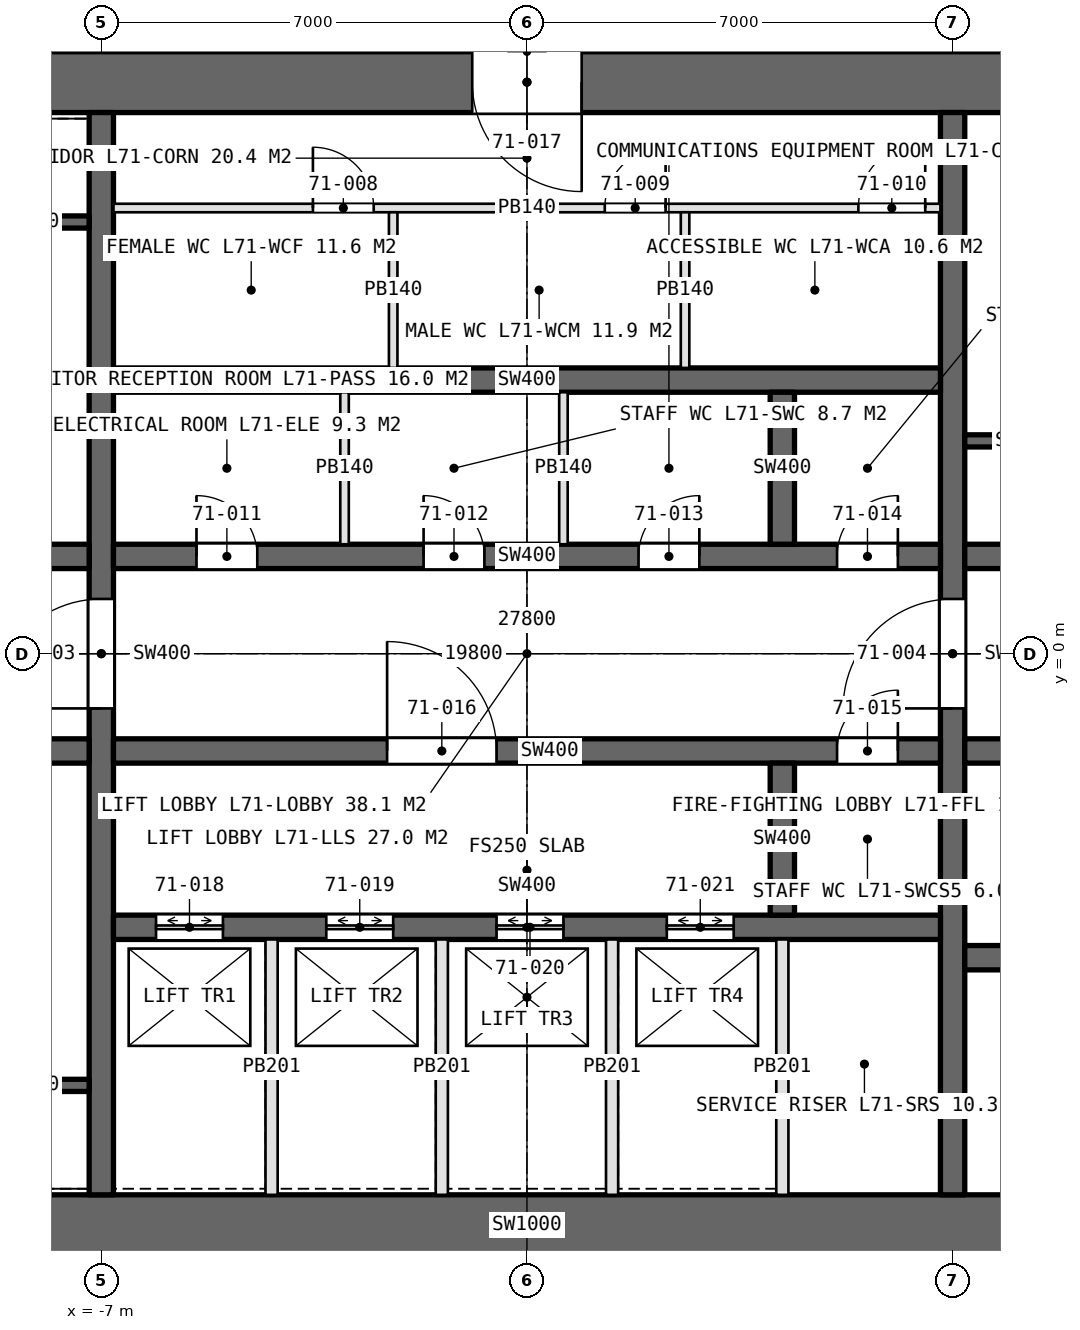
"""IFC4 building model, lengths in metres.
Left out: names, types, materials, properties, quantities, classifications, styles, units other than length and angle.
Written with IfcOpenShell. Run it as: python <this file> out.ifc"""

import sys

from ifc_helpers import new_model, si_unit, direction, frame, frame_2d, origin, place, context, subcontext, project, spatial, rectangle, extrude, element, fill, save


model = new_model("IFC4")
c1 = context("Model", 3, precision=1e-05, world=origin(), true_north=direction((0.0, 1.0)))
c2 = subcontext(c1, "Body", "Model", "MODEL_VIEW")
j1 = project(units=[si_unit("LENGTHUNIT", "METRE"), si_unit("PLANEANGLEUNIT", "RADIAN")], contexts=[c1])
p1 = place(None, origin())
s1 = spatial("IfcSite", under=j1, at=p1, CompositionType="ELEMENT")
p2 = place(p1, origin())
s2 = spatial("IfcBuilding", under=s1, at=p2, CompositionType="ELEMENT")
p3 = place(p2, frame((0.0, 0.0, 317.4)))
s3 = spatial("IfcBuildingStorey", under=s2, at=p3, CompositionType="ELEMENT", Elevation=317.4)
p4 = place(p3, frame((-13.9, -9.4, 0.0), z_axis=(0.0, 0.0, 1.0), x_axis=(1.0, 0.0, 0.0)))
e1 = element("IfcWall", 1, at=p4, inside=s3, PredefinedType="SHEAR", context=c2, shape_type="SweptSolid", body=[
    extrude(rectangle(XDim=27.8, YDim=1.0, at=frame_2d((13.9, 0.0))), origin(), (0.0, 0.0, 1.0), 4.2),
])
p5 = place(p4, frame((22.95, 0.0, 0.0)))
e2 = element("IfcOpeningElement", 2, at=p5, cuts=e1, PredefinedType="OPENING", context=c2, shape_type="SweptSolid", body=[
    extrude(rectangle(XDim=2.2, YDim=2.7, at=frame_2d((1.1, 1.35))), frame((0.0, 0.51, 0.0), z_axis=(0.0, -1.0, 0.0), x_axis=(1.0, 0.0, 0.0)), (0.0, 0.0, 1.0), 1.02),
])
p6 = place(p3, frame((13.9, 9.4, 0.0), z_axis=(0.0, 0.0, 1.0), x_axis=(-1.0, 0.0, 0.0)))
e3 = element("IfcWall", 3, at=p6, inside=s3, PredefinedType="SHEAR", context=c2, shape_type="SweptSolid", body=[
    extrude(rectangle(XDim=27.8, YDim=1.0, at=frame_2d((13.9, 0.0))), origin(), (0.0, 0.0, 1.0), 4.2),
])
p7 = place(p6, frame((23.9, 0.0, 0.0)))
e4 = element("IfcOpeningElement", 4, at=p7, cuts=e3, PredefinedType="OPENING", context=c2, shape_type="SweptSolid", body=[
    extrude(rectangle(XDim=1.0, YDim=2.4, at=frame_2d((0.5, 1.2))), frame((0.0, 0.51, 0.0), z_axis=(0.0, -1.0, 0.0), x_axis=(1.0, 0.0, 0.0)), (0.0, 0.0, 1.0), 1.02),
])
p8 = place(p6, frame((13.0, 0.0, 0.0)))
e5 = element("IfcOpeningElement", 5, at=p8, cuts=e3, PredefinedType="OPENING", context=c2, shape_type="SweptSolid", body=[
    extrude(rectangle(XDim=1.8, YDim=2.4, at=frame_2d((0.9, 1.2))), frame((0.0, 0.51, 0.0), z_axis=(0.0, -1.0, 0.0), x_axis=(1.0, 0.0, 0.0)), (0.0, 0.0, 1.0), 1.02),
])
p9 = place(p3, frame((-7.0, -8.9, 0.0), z_axis=(0.0, 0.0, 1.0), x_axis=(0.0, 1.0, 0.0)))
e6 = element("IfcWall", 6, at=p9, inside=s3, PredefinedType="SHEAR", context=c2, shape_type="SweptSolid", body=[
    extrude(rectangle(XDim=17.8, YDim=0.4, at=frame_2d((8.9, 0.0))), origin(), (0.0, 0.0, 1.0), 4.2),
])
p10 = place(p9, frame((8.0, 0.0, 0.0)))
e7 = element("IfcOpeningElement", 7, at=p10, cuts=e6, PredefinedType="OPENING", context=c2, shape_type="SweptSolid", body=[
    extrude(rectangle(XDim=1.8, YDim=2.4, at=frame_2d((0.9, 1.2))), frame((0.0, 0.21, 0.0), z_axis=(0.0, -1.0, 0.0), x_axis=(1.0, 0.0, 0.0)), (0.0, 0.0, 1.0), 0.42),
])
p11 = place(p3, frame((7.0, -8.9, 0.0), z_axis=(0.0, 0.0, 1.0), x_axis=(0.0, 1.0, 0.0)))
e8 = element("IfcWall", 8, at=p11, inside=s3, PredefinedType="SHEAR", context=c2, shape_type="SweptSolid", body=[
    extrude(rectangle(XDim=17.8, YDim=0.4, at=frame_2d((8.9, 0.0))), origin(), (0.0, 0.0, 1.0), 4.2),
])
p12 = place(p11, frame((8.0, 0.0, 0.0)))
e9 = element("IfcOpeningElement", 9, at=p12, cuts=e8, PredefinedType="OPENING", context=c2, shape_type="SweptSolid", body=[
    extrude(rectangle(XDim=1.8, YDim=2.4, at=frame_2d((0.9, 1.2))), frame((0.0, 0.21, 0.0), z_axis=(0.0, -1.0, 0.0), x_axis=(1.0, 0.0, 0.0)), (0.0, 0.0, 1.0), 0.42),
])
p13 = place(p3, frame((-6.8, 1.6, 0.0), z_axis=(0.0, 0.0, 1.0), x_axis=(1.0, 0.0, 0.0)))
e10 = element("IfcWall", 10, at=p13, inside=s3, PredefinedType="SHEAR", context=c2, shape_type="SweptSolid", body=[
    extrude(rectangle(XDim=13.6, YDim=0.4, at=frame_2d((6.8, 0.0))), origin(), (0.0, 0.0, 1.0), 4.2),
])
p14 = place(p13, frame((1.365, 0.0, 0.0)))
e11 = element("IfcOpeningElement", 11, at=p14, cuts=e10, PredefinedType="OPENING", context=c2, shape_type="SweptSolid", body=[
    extrude(rectangle(XDim=1.0, YDim=2.4, at=frame_2d((0.5, 1.2))), frame((0.0, 0.21, 0.0), z_axis=(0.0, -1.0, 0.0), x_axis=(1.0, 0.0, 0.0)), (0.0, 0.0, 1.0), 0.42),
])
p15 = place(p13, frame((5.1, 0.0, 0.0)))
e12 = element("IfcOpeningElement", 12, at=p15, cuts=e10, PredefinedType="OPENING", context=c2, shape_type="SweptSolid", body=[
    extrude(rectangle(XDim=1.0, YDim=2.4, at=frame_2d((0.5, 1.2))), frame((0.0, 0.21, 0.0), z_axis=(0.0, -1.0, 0.0), x_axis=(1.0, 0.0, 0.0)), (0.0, 0.0, 1.0), 0.42),
])
p16 = place(p13, frame((8.635, 0.0, 0.0)))
e13 = element("IfcOpeningElement", 13, at=p16, cuts=e10, PredefinedType="OPENING", context=c2, shape_type="SweptSolid", body=[
    extrude(rectangle(XDim=1.0, YDim=2.4, at=frame_2d((0.5, 1.2))), frame((0.0, 0.21, 0.0), z_axis=(0.0, -1.0, 0.0), x_axis=(1.0, 0.0, 0.0)), (0.0, 0.0, 1.0), 0.42),
])
p17 = place(p13, frame((11.9, 0.0, 0.0)))
e14 = element("IfcOpeningElement", 14, at=p17, cuts=e10, PredefinedType="OPENING", context=c2, shape_type="SweptSolid", body=[
    extrude(rectangle(XDim=1.0, YDim=2.4, at=frame_2d((0.5, 1.2))), frame((0.0, 0.21, 0.0), z_axis=(0.0, -1.0, 0.0), x_axis=(1.0, 0.0, 0.0)), (0.0, 0.0, 1.0), 0.42),
])
p18 = place(p3, frame((-6.8, -1.6, 0.0), z_axis=(0.0, 0.0, 1.0), x_axis=(1.0, 0.0, 0.0)))
e15 = element("IfcWall", 15, at=p18, inside=s3, PredefinedType="SHEAR", context=c2, shape_type="SweptSolid", body=[
    extrude(rectangle(XDim=13.6, YDim=0.4, at=frame_2d((6.8, 0.0))), origin(), (0.0, 0.0, 1.0), 4.2),
])
p19 = place(p18, frame((11.9, 0.0, 0.0)))
e16 = element("IfcOpeningElement", 16, at=p19, cuts=e15, PredefinedType="OPENING", context=c2, shape_type="SweptSolid", body=[
    extrude(rectangle(XDim=1.0, YDim=2.4, at=frame_2d((0.5, 1.2))), frame((0.0, 0.21, 0.0), z_axis=(0.0, -1.0, 0.0), x_axis=(1.0, 0.0, 0.0)), (0.0, 0.0, 1.0), 0.42),
])
p20 = place(p18, frame((4.5, 0.0, 0.0)))
e17 = element("IfcOpeningElement", 17, at=p20, cuts=e15, PredefinedType="OPENING", context=c2, shape_type="SweptSolid", body=[
    extrude(rectangle(XDim=1.8, YDim=2.4, at=frame_2d((0.9, 1.2))), frame((0.0, 0.21, 0.0), z_axis=(0.0, -1.0, 0.0), x_axis=(1.0, 0.0, 0.0)), (0.0, 0.0, 1.0), 0.42),
])
p21 = place(p3, frame((-6.8, 4.5, 0.0), z_axis=(0.0, 0.0, 1.0), x_axis=(1.0, 0.0, 0.0)))
e18 = element("IfcWall", 18, at=p21, inside=s3, PredefinedType="SHEAR", context=c2, shape_type="SweptSolid", body=[
    extrude(rectangle(XDim=13.6, YDim=0.4, at=frame_2d((6.8, 0.0))), origin(), (0.0, 0.0, 1.0), 4.2),
])
p22 = place(p3, frame((-6.8, -4.5, 0.0), z_axis=(0.0, 0.0, 1.0), x_axis=(1.0, 0.0, 0.0)))
e19 = element("IfcWall", 19, at=p22, inside=s3, PredefinedType="SHEAR", context=c2, shape_type="SweptSolid", body=[
    extrude(rectangle(XDim=13.6, YDim=0.4, at=frame_2d((6.8, 0.0))), origin(), (0.0, 0.0, 1.0), 4.2),
])
p23 = place(p22, frame((0.7, 0.0, 0.0)))
e20 = element("IfcOpeningElement", 20, at=p23, cuts=e19, PredefinedType="OPENING", context=c2, shape_type="SweptSolid", body=[
    extrude(rectangle(XDim=1.1, YDim=2.4, at=frame_2d((0.55, 1.2))), frame((0.0, 0.21, 0.0), z_axis=(0.0, -1.0, 0.0), x_axis=(1.0, 0.0, 0.0)), (0.0, 0.0, 1.0), 0.42),
])
p24 = place(p22, frame((3.5, 0.0, 0.0)))
e21 = element("IfcOpeningElement", 21, at=p24, cuts=e19, PredefinedType="OPENING", context=c2, shape_type="SweptSolid", body=[
    extrude(rectangle(XDim=1.1, YDim=2.4, at=frame_2d((0.55, 1.2))), frame((0.0, 0.21, 0.0), z_axis=(0.0, -1.0, 0.0), x_axis=(1.0, 0.0, 0.0)), (0.0, 0.0, 1.0), 0.42),
])
p25 = place(p22, frame((6.3, 0.0, 0.0)))
e22 = element("IfcOpeningElement", 22, at=p25, cuts=e19, PredefinedType="OPENING", context=c2, shape_type="SweptSolid", body=[
    extrude(rectangle(XDim=1.1, YDim=2.4, at=frame_2d((0.55, 1.2))), frame((0.0, 0.21, 0.0), z_axis=(0.0, -1.0, 0.0), x_axis=(1.0, 0.0, 0.0)), (0.0, 0.0, 1.0), 0.42),
])
p26 = place(p22, frame((9.1, 0.0, 0.0)))
e23 = element("IfcOpeningElement", 23, at=p26, cuts=e19, PredefinedType="OPENING", context=c2, shape_type="SweptSolid", body=[
    extrude(rectangle(XDim=1.1, YDim=2.4, at=frame_2d((0.55, 1.2))), frame((0.0, 0.21, 0.0), z_axis=(0.0, -1.0, 0.0), x_axis=(1.0, 0.0, 0.0)), (0.0, 0.0, 1.0), 0.42),
])
for number, where, z_axis, x_axis in (
    (24, (-12.9, 1.6, 0.0), (0.0, 0.0, 1.0), (1.0, 0.0, 0.0)),
    (25, (-12.9, -1.6, 0.0), (0.0, 0.0, 1.0), (1.0, 0.0, 0.0)),
):
    element("IfcWall", number, at=place(p3, frame(where, z_axis=z_axis, x_axis=x_axis)), inside=s3, PredefinedType="SHEAR", context=c2, shape_type="SweptSolid", body=[
        extrude(rectangle(XDim=5.7, YDim=0.4, at=frame_2d((2.85, 0.0))), origin(), (0.0, 0.0, 1.0), 4.2),
    ])
p27 = place(p3, frame((7.2, 1.6, 0.0), z_axis=(0.0, 0.0, 1.0), x_axis=(1.0, 0.0, 0.0)))
e26 = element("IfcWall", 26, at=p27, inside=s3, PredefinedType="SHEAR", context=c2, shape_type="SweptSolid", body=[
    extrude(rectangle(XDim=5.7, YDim=0.4, at=frame_2d((2.85, 0.0))), origin(), (0.0, 0.0, 1.0), 4.2),
])
p28 = place(p27, frame((0.7, 0.0, 0.0)))
e27 = element("IfcOpeningElement", 27, at=p28, cuts=e26, PredefinedType="OPENING", context=c2, shape_type="SweptSolid", body=[
    extrude(rectangle(XDim=1.0, YDim=2.4, at=frame_2d((0.5, 1.2))), frame((0.0, 0.21, 0.0), z_axis=(0.0, -1.0, 0.0), x_axis=(1.0, 0.0, 0.0)), (0.0, 0.0, 1.0), 0.42),
])
p29 = place(p3, frame((7.2, -1.6, 0.0), z_axis=(0.0, 0.0, 1.0), x_axis=(1.0, 0.0, 0.0)))
e28 = element("IfcWall", 28, at=p29, inside=s3, PredefinedType="SHEAR", context=c2, shape_type="SweptSolid", body=[
    extrude(rectangle(XDim=5.7, YDim=0.4, at=frame_2d((2.85, 0.0))), origin(), (0.0, 0.0, 1.0), 4.2),
])
p30 = place(p29, frame((0.9, 0.0, 0.0)))
e29 = element("IfcOpeningElement", 29, at=p30, cuts=e28, PredefinedType="OPENING", context=c2, shape_type="SweptSolid", body=[
    extrude(rectangle(XDim=1.3, YDim=2.4, at=frame_2d((0.65, 1.2))), frame((0.0, 0.21, 0.0), z_axis=(0.0, -1.0, 0.0), x_axis=(1.0, 0.0, 0.0)), (0.0, 0.0, 1.0), 0.42),
])
p31 = place(p29, frame((3.95, 0.0, 0.0)))
e30 = element("IfcOpeningElement", 30, at=p31, cuts=e28, PredefinedType="OPENING", context=c2, shape_type="SweptSolid", body=[
    extrude(rectangle(XDim=1.3, YDim=2.4, at=frame_2d((0.65, 1.2))), frame((0.0, 0.21, 0.0), z_axis=(0.0, -1.0, 0.0), x_axis=(1.0, 0.0, 0.0)), (0.0, 0.0, 1.0), 0.42),
])
p32 = place(p3, frame((7.2, -5.0, 0.0), z_axis=(0.0, 0.0, 1.0), x_axis=(1.0, 0.0, 0.0)))
e31 = element("IfcWall", 31, at=p32, inside=s3, PredefinedType="SHEAR", context=c2, shape_type="SweptSolid", body=[
    extrude(rectangle(XDim=5.7, YDim=0.4, at=frame_2d((2.85, 0.0))), origin(), (0.0, 0.0, 1.0), 4.2),
])
for number, where, z_axis, x_axis in (
    (32, (4.2, 1.8, 0.0), (0.0, 0.0, 1.0), (0.0, 1.0, 0.0)),
    (33, (4.2, -4.3, 0.0), (0.0, 0.0, 1.0), (0.0, 1.0, 0.0)),
):
    element("IfcWall", number, at=place(p3, frame(where, z_axis=z_axis, x_axis=x_axis)), inside=s3, PredefinedType="SHEAR", context=c2, shape_type="SweptSolid", body=[
        extrude(rectangle(XDim=2.5, YDim=0.4, at=frame_2d((1.25, 0.0))), origin(), (0.0, 0.0, 1.0), 4.2),
    ])
p33 = place(p3, frame((-6.8, 7.33, 0.0), z_axis=(0.0, 0.0, 1.0), x_axis=(1.0, 0.0, 0.0)))
e34 = element("IfcWall", 34, at=p33, inside=s3, PredefinedType="PARTITIONING", context=c2, shape_type="SweptSolid", body=[
    extrude(rectangle(XDim=13.6, YDim=0.14, at=frame_2d((6.8, 0.0))), origin(), (0.0, 0.0, 1.0), 3.95),
])
p34 = place(p33, frame((3.28, 0.0, 0.0)))
e35 = element("IfcOpeningElement", 35, at=p34, cuts=e34, PredefinedType="OPENING", context=c2, shape_type="SweptSolid", body=[
    extrude(rectangle(XDim=1.0, YDim=2.4, at=frame_2d((0.5, 1.2))), frame((0.0, 0.08, 0.0), z_axis=(0.0, -1.0, 0.0), x_axis=(1.0, 0.0, 0.0)), (0.0, 0.0, 1.0), 0.16),
])
p35 = place(p33, frame((8.08, 0.0, 0.0)))
e36 = element("IfcOpeningElement", 36, at=p35, cuts=e34, PredefinedType="OPENING", context=c2, shape_type="SweptSolid", body=[
    extrude(rectangle(XDim=1.0, YDim=2.4, at=frame_2d((0.5, 1.2))), frame((0.0, 0.08, 0.0), z_axis=(0.0, -1.0, 0.0), x_axis=(1.0, 0.0, 0.0)), (0.0, 0.0, 1.0), 0.16),
])
p36 = place(p33, frame((12.25, 0.0, 0.0)))
e37 = element("IfcOpeningElement", 37, at=p36, cuts=e34, PredefinedType="OPENING", context=c2, shape_type="SweptSolid", body=[
    extrude(rectangle(XDim=1.1, YDim=2.4, at=frame_2d((0.55, 1.2))), frame((0.0, 0.08, 0.0), z_axis=(0.0, -1.0, 0.0), x_axis=(1.0, 0.0, 0.0)), (0.0, 0.0, 1.0), 0.16),
])
for number, where, z_axis, x_axis in (
    (38, (-2.2, 4.7, 0.0), (0.0, 0.0, 1.0), (0.0, 1.0, 0.0)),
    (39, (2.6, 4.7, 0.0), (0.0, 0.0, 1.0), (0.0, 1.0, 0.0)),
):
    element("IfcWall", number, at=place(p3, frame(where, z_axis=z_axis, x_axis=x_axis)), inside=s3, PredefinedType="PARTITIONING", context=c2, shape_type="SweptSolid", body=[
        extrude(rectangle(XDim=2.56, YDim=0.14, at=frame_2d((1.28, 0.0))), origin(), (0.0, 0.0, 1.0), 3.95),
    ])
for number, where, z_axis, x_axis in (
    (40, (-3.0, 1.8, 0.0), (0.0, 0.0, 1.0), (0.0, 1.0, 0.0)),
    (41, (0.6, 1.8, 0.0), (0.0, 0.0, 1.0), (0.0, 1.0, 0.0)),
):
    element("IfcWall", number, at=place(p3, frame(where, z_axis=z_axis, x_axis=x_axis)), inside=s3, PredefinedType="PARTITIONING", context=c2, shape_type="SweptSolid", body=[
        extrude(rectangle(XDim=2.5, YDim=0.14, at=frame_2d((1.25, 0.0))), origin(), (0.0, 0.0, 1.0), 3.95),
    ])
for number, where, z_axis, x_axis in (
    (42, (-4.2, -4.7, 0.0), (0.0, 0.0, 1.0), (0.0, -1.0, 0.0)),
    (43, (-1.4, -4.7, 0.0), (0.0, 0.0, 1.0), (0.0, -1.0, 0.0)),
    (44, (1.4, -4.7, 0.0), (0.0, 0.0, 1.0), (0.0, -1.0, 0.0)),
    (45, (4.2, -4.7, 0.0), (0.0, 0.0, 1.0), (0.0, -1.0, 0.0)),
):
    element("IfcWall", number, at=place(p3, frame(where, z_axis=z_axis, x_axis=x_axis)), inside=s3, PredefinedType="PARTITIONING", context=c2, shape_type="SweptSolid", body=[
        extrude(rectangle(XDim=4.2, YDim=0.2, at=frame_2d((2.1, 0.0))), origin(), (0.0, 0.0, 1.0), 4.2),
    ])
for number, where, z_axis, x_axis in (
    (46, (-9.15, 7.1, 0.0), (0.0, 0.0, 1.0), (1.0, 0.0, 0.0)),
    (47, (-9.15, -7.1, 0.0), (0.0, 0.0, 1.0), (1.0, 0.0, 0.0)),
    (48, (9.15, 3.5, 0.0), (0.0, 0.0, 1.0), (-1.0, 0.0, 0.0)),
):
    element("IfcWall", number, at=place(p3, frame(where, z_axis=z_axis, x_axis=x_axis)), inside=s3, PredefinedType="SOLIDWALL", context=c2, shape_type="SweptSolid", body=[
        extrude(rectangle(XDim=1.95, YDim=0.2, at=frame_2d((0.975, 0.0))), origin(), (0.0, 0.0, 1.0), 4.2),
    ])
p37 = place(p10, origin())
e49 = element("IfcDoor", 49, at=p37, inside=s3, OperationType="DOUBLE_DOOR_SINGLE_SWING", PredefinedType="DOOR", context=c2, shape_type="SweptSolid", body=[
    extrude(rectangle(XDim=1.8, YDim=2.4, at=frame_2d((0.9, 1.2))), frame((0.0, 0.025, 0.0), z_axis=(0.0, -1.0, 0.0), x_axis=(1.0, 0.0, 0.0)), (0.0, 0.0, 1.0), 0.05),
])
fill(e7, e49)
p38 = place(p12, origin())
e50 = element("IfcDoor", 50, at=p38, inside=s3, OperationType="DOUBLE_DOOR_SINGLE_SWING", PredefinedType="DOOR", context=c2, shape_type="SweptSolid", body=[
    extrude(rectangle(XDim=1.8, YDim=2.4, at=frame_2d((0.9, 1.2))), frame((0.0, 0.025, 0.0), z_axis=(0.0, -1.0, 0.0), x_axis=(1.0, 0.0, 0.0)), (0.0, 0.0, 1.0), 0.05),
])
fill(e9, e50)
p39 = place(p34, origin())
e51 = element("IfcDoor", 51, at=p39, inside=s3, OperationType="SINGLE_SWING_LEFT", PredefinedType="DOOR", context=c2, shape_type="SweptSolid", body=[
    extrude(rectangle(XDim=1.0, YDim=2.4, at=frame_2d((0.5, 1.2))), frame((0.0, 0.025, 0.0), z_axis=(0.0, -1.0, 0.0), x_axis=(1.0, 0.0, 0.0)), (0.0, 0.0, 1.0), 0.05),
])
fill(e35, e51)
p40 = place(p35, origin())
e52 = element("IfcDoor", 52, at=p40, inside=s3, OperationType="SINGLE_SWING_RIGHT", PredefinedType="DOOR", context=c2, shape_type="SweptSolid", body=[
    extrude(rectangle(XDim=1.0, YDim=2.4, at=frame_2d((0.5, 1.2))), frame((0.0, 0.025, 0.0), z_axis=(0.0, -1.0, 0.0), x_axis=(1.0, 0.0, 0.0)), (0.0, 0.0, 1.0), 0.05),
])
fill(e36, e52)
p41 = place(p36, origin())
e53 = element("IfcDoor", 53, at=p41, inside=s3, OperationType="SINGLE_SWING_RIGHT", PredefinedType="DOOR", context=c2, shape_type="SweptSolid", body=[
    extrude(rectangle(XDim=1.1, YDim=2.4, at=frame_2d((0.55, 1.2))), frame((0.0, 0.025, 0.0), z_axis=(0.0, -1.0, 0.0), x_axis=(1.0, 0.0, 0.0)), (0.0, 0.0, 1.0), 0.05),
])
fill(e37, e53)
p42 = place(p14, origin())
e54 = element("IfcDoor", 54, at=p42, inside=s3, OperationType="SINGLE_SWING_LEFT", PredefinedType="DOOR", context=c2, shape_type="SweptSolid", body=[
    extrude(rectangle(XDim=1.0, YDim=2.4, at=frame_2d((0.5, 1.2))), frame((0.0, 0.025, 0.0), z_axis=(0.0, -1.0, 0.0), x_axis=(1.0, 0.0, 0.0)), (0.0, 0.0, 1.0), 0.05),
])
fill(e11, e54)
p43 = place(p15, origin())
e55 = element("IfcDoor", 55, at=p43, inside=s3, OperationType="SINGLE_SWING_LEFT", PredefinedType="DOOR", context=c2, shape_type="SweptSolid", body=[
    extrude(rectangle(XDim=1.0, YDim=2.4, at=frame_2d((0.5, 1.2))), frame((0.0, 0.025, 0.0), z_axis=(0.0, -1.0, 0.0), x_axis=(1.0, 0.0, 0.0)), (0.0, 0.0, 1.0), 0.05),
])
fill(e12, e55)
p44 = place(p16, origin())
e56 = element("IfcDoor", 56, at=p44, inside=s3, OperationType="SINGLE_SWING_RIGHT", PredefinedType="DOOR", context=c2, shape_type="SweptSolid", body=[
    extrude(rectangle(XDim=1.0, YDim=2.4, at=frame_2d((0.5, 1.2))), frame((0.0, 0.025, 0.0), z_axis=(0.0, -1.0, 0.0), x_axis=(1.0, 0.0, 0.0)), (0.0, 0.0, 1.0), 0.05),
])
fill(e13, e56)
p45 = place(p17, origin())
e57 = element("IfcDoor", 57, at=p45, inside=s3, OperationType="SINGLE_SWING_RIGHT", PredefinedType="DOOR", context=c2, shape_type="SweptSolid", body=[
    extrude(rectangle(XDim=1.0, YDim=2.4, at=frame_2d((0.5, 1.2))), frame((0.0, 0.025, 0.0), z_axis=(0.0, -1.0, 0.0), x_axis=(1.0, 0.0, 0.0)), (0.0, 0.0, 1.0), 0.05),
])
fill(e14, e57)
p46 = place(p19, origin())
e58 = element("IfcDoor", 58, at=p46, inside=s3, OperationType="SINGLE_SWING_RIGHT", PredefinedType="DOOR", context=c2, shape_type="SweptSolid", body=[
    extrude(rectangle(XDim=1.0, YDim=2.4, at=frame_2d((0.5, 1.2))), frame((0.0, 0.025, 0.0), z_axis=(0.0, -1.0, 0.0), x_axis=(1.0, 0.0, 0.0)), (0.0, 0.0, 1.0), 0.05),
])
fill(e16, e58)
p47 = place(p20, origin())
e59 = element("IfcDoor", 59, at=p47, inside=s3, OperationType="DOUBLE_DOOR_SINGLE_SWING", PredefinedType="DOOR", context=c2, shape_type="SweptSolid", body=[
    extrude(rectangle(XDim=1.8, YDim=2.4, at=frame_2d((0.9, 1.2))), frame((0.0, 0.025, 0.0), z_axis=(0.0, -1.0, 0.0), x_axis=(1.0, 0.0, 0.0)), (0.0, 0.0, 1.0), 0.05),
])
fill(e17, e59)
p48 = place(p8, origin())
e60 = element("IfcDoor", 60, at=p48, inside=s3, OperationType="DOUBLE_DOOR_SINGLE_SWING", PredefinedType="DOOR", context=c2, shape_type="SweptSolid", body=[
    extrude(rectangle(XDim=1.8, YDim=2.4, at=frame_2d((0.9, 1.2))), frame((0.0, 0.025, 0.0), z_axis=(0.0, -1.0, 0.0), x_axis=(1.0, 0.0, 0.0)), (0.0, 0.0, 1.0), 0.05),
])
fill(e5, e60)
p49 = place(p23, origin())
e61 = element("IfcDoor", 61, at=p49, inside=s3, OperationType="DOUBLE_DOOR_SLIDING", PredefinedType="DOOR", context=c2, shape_type="SweptSolid", body=[
    extrude(rectangle(XDim=1.1, YDim=2.4, at=frame_2d((0.55, 1.2))), frame((0.0, 0.025, 0.0), z_axis=(0.0, -1.0, 0.0), x_axis=(1.0, 0.0, 0.0)), (0.0, 0.0, 1.0), 0.05),
])
fill(e20, e61)
p50 = place(p24, origin())
e62 = element("IfcDoor", 62, at=p50, inside=s3, OperationType="DOUBLE_DOOR_SLIDING", PredefinedType="DOOR", context=c2, shape_type="SweptSolid", body=[
    extrude(rectangle(XDim=1.1, YDim=2.4, at=frame_2d((0.55, 1.2))), frame((0.0, 0.025, 0.0), z_axis=(0.0, -1.0, 0.0), x_axis=(1.0, 0.0, 0.0)), (0.0, 0.0, 1.0), 0.05),
])
fill(e21, e62)
p51 = place(p25, origin())
e63 = element("IfcDoor", 63, at=p51, inside=s3, OperationType="DOUBLE_DOOR_SLIDING", PredefinedType="DOOR", context=c2, shape_type="SweptSolid", body=[
    extrude(rectangle(XDim=1.1, YDim=2.4, at=frame_2d((0.55, 1.2))), frame((0.0, 0.025, 0.0), z_axis=(0.0, -1.0, 0.0), x_axis=(1.0, 0.0, 0.0)), (0.0, 0.0, 1.0), 0.05),
])
fill(e22, e63)
p52 = place(p26, origin())
e64 = element("IfcDoor", 64, at=p52, inside=s3, OperationType="DOUBLE_DOOR_SLIDING", PredefinedType="DOOR", context=c2, shape_type="SweptSolid", body=[
    extrude(rectangle(XDim=1.1, YDim=2.4, at=frame_2d((0.55, 1.2))), frame((0.0, 0.025, 0.0), z_axis=(0.0, -1.0, 0.0), x_axis=(1.0, 0.0, 0.0)), (0.0, 0.0, 1.0), 0.05),
])
fill(e23, e64)
save(model, sys.argv[1])
